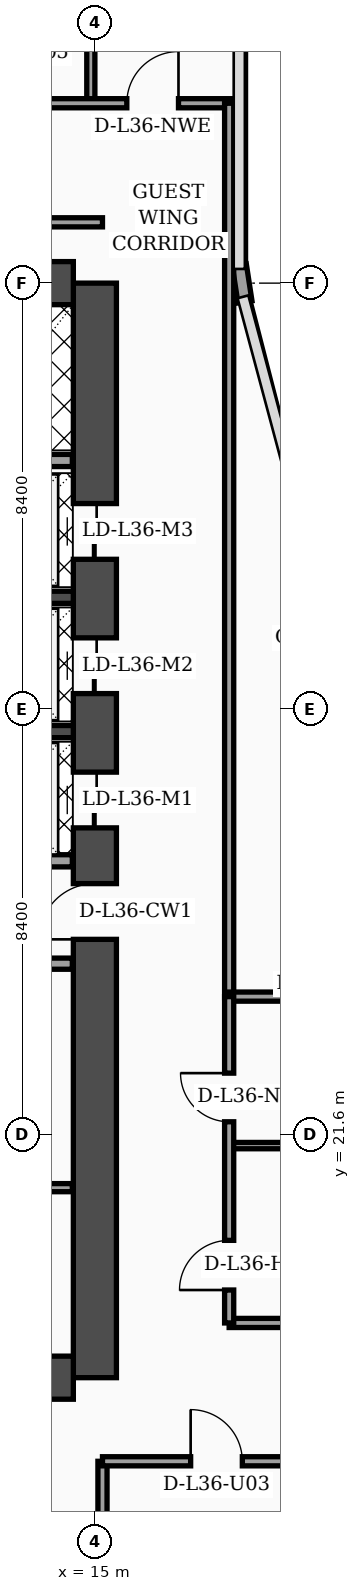
"""IFC4 building model, lengths in metres.
Left out: names, types, materials, properties, quantities, classifications, styles, units other than length and angle.
Written with IfcOpenShell. Run it as: python <this file> out.ifc"""

import sys

from ifc_helpers import new_model, si_unit, direction, frame, frame_2d, origin, place, context, subcontext, project, spatial, rectangle, extrude, element, fill, save


model = new_model("IFC4")
c1 = context("Model", 3, precision=1e-05, world=origin(), true_north=direction((0.0, 1.0)))
c2 = subcontext(c1, "Body", "Model", "MODEL_VIEW")
j1 = project(units=[si_unit("LENGTHUNIT", "METRE"), si_unit("PLANEANGLEUNIT", "RADIAN")], contexts=[c1])
p1 = place(None, origin())
s1 = spatial("IfcSite", under=j1, at=p1, CompositionType="ELEMENT")
p2 = place(p1, origin())
s2 = spatial("IfcBuilding", under=s1, at=p2, CompositionType="ELEMENT")
p3 = place(p2, frame((0.0, 0.0, 148.5)))
s3 = spatial("IfcBuildingStorey", under=s2, at=p3, CompositionType="ELEMENT", Elevation=148.5)
p4 = place(p3, frame((15.0, 16.8, 0.0), z_axis=(0.0, 0.0, 1.0), x_axis=(0.0, 1.0, 0.0)))
e1 = element("IfcWall", 1, at=p4, inside=s3, PredefinedType="SHEAR", context=c2, shape_type="SweptSolid", body=[
    extrude(rectangle(XDim=21.6, YDim=0.85, at=frame_2d((10.8, 0.0))), origin(), (0.0, 0.0, 1.0), 3.56),
])
p5 = place(p4, frame((8.65, 0.0, 0.0)))
e2 = element("IfcOpeningElement", 2, at=p5, cuts=e1, PredefinedType="OPENING", context=c2, shape_type="SweptSolid", body=[
    extrude(rectangle(XDim=1.1, YDim=2.2, at=frame_2d((0.55, 1.1))), frame((0.0, 0.435, 0.0), z_axis=(0.0, -1.0, 0.0), x_axis=(1.0, 0.0, 0.0)), (0.0, 0.0, 1.0), 0.87),
])
p6 = place(p4, frame((10.85, 0.0, 0.0)))
e3 = element("IfcOpeningElement", 3, at=p6, cuts=e1, PredefinedType="OPENING", context=c2, shape_type="SweptSolid", body=[
    extrude(rectangle(XDim=1.1, YDim=2.2, at=frame_2d((0.55, 1.1))), frame((0.0, 0.435, 0.0), z_axis=(0.0, -1.0, 0.0), x_axis=(1.0, 0.0, 0.0)), (0.0, 0.0, 1.0), 0.87),
])
p7 = place(p4, frame((13.5, 0.0, 0.0)))
e4 = element("IfcOpeningElement", 4, at=p7, cuts=e1, PredefinedType="OPENING", context=c2, shape_type="SweptSolid", body=[
    extrude(rectangle(XDim=1.1, YDim=2.2, at=frame_2d((0.55, 1.1))), frame((0.0, 0.435, 0.0), z_axis=(0.0, -1.0, 0.0), x_axis=(1.0, 0.0, 0.0)), (0.0, 0.0, 1.0), 0.87),
])
p8 = place(p4, frame((16.15, 0.0, 0.0)))
e5 = element("IfcOpeningElement", 5, at=p8, cuts=e1, PredefinedType="OPENING", context=c2, shape_type="SweptSolid", body=[
    extrude(rectangle(XDim=1.1, YDim=2.2, at=frame_2d((0.55, 1.1))), frame((0.0, 0.435, 0.0), z_axis=(0.0, -1.0, 0.0), x_axis=(1.0, 0.0, 0.0)), (0.0, 0.0, 1.0), 0.87),
])
for number, where, z_axis, x_axis in (
    (6, (4.625, 38.4, 0.0), (0.0, 0.0, 1.0), (1.0, 0.0, 0.0)),
    (7, (4.625, 16.8, 0.0), (0.0, 0.0, 1.0), (1.0, 0.0, 0.0)),
):
    element("IfcWall", number, at=place(p3, frame(where, z_axis=z_axis, x_axis=x_axis)), inside=s3, PredefinedType="SHEAR", context=c2, shape_type="SweptSolid", body=[
        extrude(rectangle(XDim=9.95, YDim=0.85, at=frame_2d((4.975, 0.0))), origin(), (0.0, 0.0, 1.0), 3.56),
    ])
for number, where, z_axis, x_axis in (
    (8, (12.18, 29.55, 0.0), (0.0, 0.0, 1.0), (1.0, 0.0, 0.0)),
    (9, (12.18, 32.2, 0.0), (0.0, 0.0, 1.0), (1.0, 0.0, 0.0)),
):
    element("IfcWall", number, at=place(p3, frame(where, z_axis=z_axis, x_axis=x_axis)), inside=s3, PredefinedType="SOLIDWALL", context=c2, shape_type="SweptSolid", body=[
        extrude(rectangle(XDim=2.395, YDim=0.24, at=frame_2d((1.198, 0.0))), origin(), (0.0, 0.0, 1.0), 3.56),
    ])
p9 = place(p3, frame((17.962, 38.03, 0.0), z_axis=(0.0, 0.0, 1.0), x_axis=(-0.15141125477, 0.988470855377, 0.0)))
e10 = element("IfcWall", 10, at=p9, inside=s3, PredefinedType="SOLIDWALL", context=c2, shape_type="SweptSolid", body=[
    extrude(rectangle(XDim=0.739, YDim=0.28, at=frame_2d((0.369, 0.0))), origin(), (0.0, 0.0, 1.0), 3.56),
])
p10 = place(p3, frame((9.68, 20.55, 0.0), z_axis=(0.0, 0.0, 1.0), x_axis=(1.0, 0.0, 0.0)))
e11 = element("IfcWall", 11, at=p10, inside=s3, PredefinedType="PARTITIONING", context=c2, shape_type="SweptSolid", body=[
    extrude(rectangle(XDim=4.875, YDim=0.16, at=frame_2d((2.438, 0.0))), origin(), (0.0, 0.0, 1.0), 3.56),
])
p11 = place(p10, frame((1.1, 0.0, 0.0)))
e12 = element("IfcOpeningElement", 12, at=p11, cuts=e11, PredefinedType="OPENING", context=c2, shape_type="SweptSolid", body=[
    extrude(rectangle(XDim=0.98, YDim=2.15, at=frame_2d((0.49, 1.075))), frame((0.0, 0.09, 0.0), z_axis=(0.0, -1.0, 0.0), x_axis=(1.0, 0.0, 0.0)), (0.0, 0.0, 1.0), 0.18),
])
p12 = place(p3, frame((9.68, 24.97, 0.0), z_axis=(0.0, 0.0, 1.0), x_axis=(1.0, 0.0, 0.0)))
e13 = element("IfcWall", 13, at=p12, inside=s3, PredefinedType="SOLIDWALL", context=c2, shape_type="SweptSolid", body=[
    extrude(rectangle(XDim=4.875, YDim=0.22, at=frame_2d((2.438, 0.0))), origin(), (0.0, 0.0, 1.0), 2.94),
])
p13 = place(p12, frame((0.9, 0.0, 0.0)))
e14 = element("IfcOpeningElement", 14, at=p13, cuts=e13, PredefinedType="OPENING", context=c2, shape_type="SweptSolid", body=[
    extrude(rectangle(XDim=0.98, YDim=2.15, at=frame_2d((0.49, 1.075))), frame((0.0, 0.12, 0.0), z_axis=(0.0, -1.0, 0.0), x_axis=(1.0, 0.0, 0.0)), (0.0, 0.0, 1.0), 0.24),
])
p14 = place(p3, frame((12.25, 27.0, 0.0), z_axis=(0.0, 0.0, 1.0), x_axis=(1.0, 0.0, 0.0)))
e15 = element("IfcWall", 15, at=p14, inside=s3, PredefinedType="SOLIDWALL", context=c2, shape_type="SweptSolid", body=[
    extrude(rectangle(XDim=2.305, YDim=0.24, at=frame_2d((1.152, 0.0))), origin(), (0.0, 0.0, 1.0), 3.56),
])
p15 = place(p3, frame((9.66, 34.9, 0.0), z_axis=(0.0, 0.0, 1.0), x_axis=(1.0, 0.0, 0.0)))
e16 = element("IfcWall", 16, at=p15, inside=s3, PredefinedType="SOLIDWALL", context=c2, shape_type="SweptSolid", body=[
    extrude(rectangle(XDim=4.895, YDim=0.24, at=frame_2d((2.448, 0.0))), origin(), (0.0, 0.0, 1.0), 3.56),
])
p16 = place(p3, frame((15.15, 2.44, 0.0), z_axis=(0.0, 0.0, 1.0), x_axis=(0.0, 1.0, 0.0)))
e17 = element("IfcWall", 17, at=p16, inside=s3, PredefinedType="PARTITIONING", context=c2, shape_type="SweptSolid", body=[
    extrude(rectangle(XDim=12.71, YDim=0.18, at=frame_2d((6.355, 0.0))), origin(), (0.0, 0.0, 1.0), 3.04),
])
p17 = place(p3, frame((15.15, 15.15, 0.0), z_axis=(0.0, 0.0, 1.0), x_axis=(1.0, 0.0, 0.0)))
e18 = element("IfcWall", 18, at=p17, inside=s3, PredefinedType="PARTITIONING", context=c2, shape_type="SweptSolid", body=[
    extrude(rectangle(XDim=6.45, YDim=0.18, at=frame_2d((3.225, 0.0))), origin(), (0.0, 0.0, 1.0), 2.49),
])
p18 = place(p17, frame((1.74, 0.0, 0.0)))
e19 = element("IfcOpeningElement", 19, at=p18, cuts=e18, PredefinedType="OPENING", context=c2, shape_type="SweptSolid", body=[
    extrude(rectangle(XDim=1.02, YDim=2.2, at=frame_2d((0.51, 1.1))), frame((0.0, 0.1, 0.0), z_axis=(0.0, -1.0, 0.0), x_axis=(1.0, 0.0, 0.0)), (0.0, 0.0, 1.0), 0.2),
])
p19 = place(p3, frame((14.92, 41.95, 0.0), z_axis=(0.0, 0.0, 1.0), x_axis=(0.0, 1.0, 0.0)))
e20 = element("IfcWall", 20, at=p19, inside=s3, PredefinedType="PARTITIONING", context=c2, shape_type="SweptSolid", body=[
    extrude(rectangle(XDim=5.85, YDim=0.16, at=frame_2d((2.925, 0.0))), origin(), (0.0, 0.0, 1.0), 3.04),
])
p20 = place(p3, frame((0.08, 41.95, 0.0), z_axis=(0.0, 0.0, 1.0), x_axis=(1.0, 0.0, 0.0)))
e21 = element("IfcWall", 21, at=p20, inside=s3, PredefinedType="PARTITIONING", context=c2, shape_type="SweptSolid", body=[
    extrude(rectangle(XDim=17.77, YDim=0.18, at=frame_2d((8.885, 0.0))), origin(), (0.0, 0.0, 1.0), 2.94),
])
p21 = place(p20, frame((0.9, 0.0, 0.0)))
e22 = element("IfcOpeningElement", 22, at=p21, cuts=e21, PredefinedType="OPENING", context=c2, shape_type="SweptSolid", body=[
    extrude(rectangle(XDim=1.02, YDim=2.2, at=frame_2d((0.51, 1.1))), frame((0.0, 0.1, 0.0), z_axis=(0.0, -1.0, 0.0), x_axis=(1.0, 0.0, 0.0)), (0.0, 0.0, 1.0), 0.2),
])
p22 = place(p20, frame((4.2, 0.0, 0.0)))
e23 = element("IfcOpeningElement", 23, at=p22, cuts=e21, PredefinedType="OPENING", context=c2, shape_type="SweptSolid", body=[
    extrude(rectangle(XDim=1.02, YDim=2.2, at=frame_2d((0.51, 1.1))), frame((0.0, 0.1, 0.0), z_axis=(0.0, -1.0, 0.0), x_axis=(1.0, 0.0, 0.0)), (0.0, 0.0, 1.0), 0.2),
])
p23 = place(p20, frame((10.08, 0.0, 0.0)))
e24 = element("IfcOpeningElement", 24, at=p23, cuts=e21, PredefinedType="OPENING", context=c2, shape_type="SweptSolid", body=[
    extrude(rectangle(XDim=1.02, YDim=2.2, at=frame_2d((0.51, 1.1))), frame((0.0, 0.1, 0.0), z_axis=(0.0, -1.0, 0.0), x_axis=(1.0, 0.0, 0.0)), (0.0, 0.0, 1.0), 0.2),
])
p24 = place(p20, frame((15.55, 0.0, 0.0)))
e25 = element("IfcOpeningElement", 25, at=p24, cuts=e21, PredefinedType="OPENING", context=c2, shape_type="SweptSolid", body=[
    extrude(rectangle(XDim=1.02, YDim=2.2, at=frame_2d((0.51, 1.1))), frame((0.0, 0.1, 0.0), z_axis=(0.0, -1.0, 0.0), x_axis=(1.0, 0.0, 0.0)), (0.0, 0.0, 1.0), 0.2),
])
p25 = place(p3, frame((17.65, 24.3, 0.0), z_axis=(0.0, 0.0, 1.0), x_axis=(0.0, 1.0, 0.0)))
e26 = element("IfcWall", 26, at=p25, inside=s3, PredefinedType="PARTITIONING", context=c2, shape_type="SweptSolid", body=[
    extrude(rectangle(XDim=17.65, YDim=0.18, at=frame_2d((8.825, 0.0))), origin(), (0.0, 0.0, 1.0), 2.94),
])
p26 = place(p3, frame((3.755, 39.6, 0.0), z_axis=(0.0, 0.0, 1.0), x_axis=(1.0, 0.0, 0.0)))
e27 = element("IfcWall", 27, at=p26, inside=s3, PredefinedType="PARTITIONING", context=c2, shape_type="SweptSolid", body=[
    extrude(rectangle(XDim=11.395, YDim=0.18, at=frame_2d((5.698, 0.0))), origin(), (0.0, 0.0, 1.0), 2.94),
])
p27 = place(p3, frame((17.65, 17.88, 0.0), z_axis=(0.0, 0.0, 1.0), x_axis=(1.0, 0.0, 0.0)))
e28 = element("IfcWall", 28, at=p27, inside=s3, PredefinedType="PARTITIONING", context=c2, shape_type="SweptSolid", body=[
    extrude(rectangle(XDim=3.9, YDim=0.18, at=frame_2d((1.95, 0.0))), origin(), (0.0, 0.0, 1.0), 3.09),
])
p28 = place(p3, frame((17.65, 21.38, 0.0), z_axis=(0.0, 0.0, 1.0), x_axis=(1.0, 0.0, 0.0)))
e29 = element("IfcWall", 29, at=p28, inside=s3, PredefinedType="PARTITIONING", context=c2, shape_type="SweptSolid", body=[
    extrude(rectangle(XDim=3.9, YDim=0.125, at=frame_2d((1.95, 0.0))), origin(), (0.0, 0.0, 1.0), 3.56),
])
p29 = place(p3, frame((17.65, 24.32, 0.0), z_axis=(0.0, 0.0, 1.0), x_axis=(1.0, 0.0, 0.0)))
e30 = element("IfcWall", 30, at=p29, inside=s3, PredefinedType="PARTITIONING", context=c2, shape_type="SweptSolid", body=[
    extrude(rectangle(XDim=3.95, YDim=0.18, at=frame_2d((1.975, 0.0))), origin(), (0.0, 0.0, 1.0), 3.56),
])
p30 = place(p3, frame((17.65, 17.88, 0.0), z_axis=(0.0, 0.0, 1.0), x_axis=(0.0, 1.0, 0.0)))
e31 = element("IfcWall", 31, at=p30, inside=s3, PredefinedType="PARTITIONING", context=c2, shape_type="SweptSolid", body=[
    extrude(rectangle(XDim=6.44, YDim=0.18, at=frame_2d((3.22, 0.0))), origin(), (0.0, 0.0, 1.0), 3.09),
])
p31 = place(p30, frame((0.65, 0.0, 0.0)))
e32 = element("IfcOpeningElement", 32, at=p31, cuts=e31, PredefinedType="OPENING", context=c2, shape_type="SweptSolid", body=[
    extrude(rectangle(XDim=0.98, YDim=2.15, at=frame_2d((0.49, 1.075))), frame((0.0, 0.1, 0.0), z_axis=(0.0, -1.0, 0.0), x_axis=(1.0, 0.0, 0.0)), (0.0, 0.0, 1.0), 0.2),
])
p32 = place(p30, frame((3.97, 0.0, 0.0)))
e33 = element("IfcOpeningElement", 33, at=p32, cuts=e31, PredefinedType="OPENING", context=c2, shape_type="SweptSolid", body=[
    extrude(rectangle(XDim=0.96, YDim=2.2, at=frame_2d((0.48, 1.1))), frame((0.0, 0.1, 0.0), z_axis=(0.0, -1.0, 0.0), x_axis=(1.0, 0.0, 0.0)), (0.0, 0.0, 1.0), 0.2),
])
p33 = place(p18, origin())
e34 = element("IfcDoor", 34, at=p33, inside=s3, OperationType="SINGLE_SWING_LEFT", PredefinedType="DOOR", context=c2, shape_type="SweptSolid", body=[
    extrude(rectangle(XDim=1.02, YDim=2.2, at=frame_2d((0.51, 1.1))), frame((0.0, 0.025, 0.0), z_axis=(0.0, -1.0, 0.0), x_axis=(1.0, 0.0, 0.0)), (0.0, 0.0, 1.0), 0.05),
])
fill(e19, e34)
p34 = place(p24, origin())
e35 = element("IfcDoor", 35, at=p34, inside=s3, OperationType="SINGLE_SWING_RIGHT", PredefinedType="DOOR", context=c2, shape_type="SweptSolid", body=[
    extrude(rectangle(XDim=1.02, YDim=2.2, at=frame_2d((0.51, 1.1))), frame((0.0, 0.025, 0.0), z_axis=(0.0, -1.0, 0.0), x_axis=(1.0, 0.0, 0.0)), (0.0, 0.0, 1.0), 0.05),
])
fill(e25, e35)
p35 = place(p31, origin())
e36 = element("IfcDoor", 36, at=p35, inside=s3, OperationType="SINGLE_SWING_LEFT", PredefinedType="DOOR", context=c2, shape_type="SweptSolid", body=[
    extrude(rectangle(XDim=0.98, YDim=2.15, at=frame_2d((0.49, 1.075))), frame((0.0, 0.025, 0.0), z_axis=(0.0, -1.0, 0.0), x_axis=(1.0, 0.0, 0.0)), (0.0, 0.0, 1.0), 0.05),
])
fill(e32, e36)
p36 = place(p32, origin())
e37 = element("IfcDoor", 37, at=p36, inside=s3, OperationType="SINGLE_SWING_RIGHT", PredefinedType="DOOR", context=c2, shape_type="SweptSolid", body=[
    extrude(rectangle(XDim=0.96, YDim=2.2, at=frame_2d((0.48, 1.1))), frame((0.0, 0.025, 0.0), z_axis=(0.0, -1.0, 0.0), x_axis=(1.0, 0.0, 0.0)), (0.0, 0.0, 1.0), 0.05),
])
fill(e33, e37)
p37 = place(p5, origin())
e38 = element("IfcDoor", 38, at=p37, inside=s3, OperationType="SINGLE_SWING_LEFT", PredefinedType="DOOR", context=c2, shape_type="SweptSolid", body=[
    extrude(rectangle(XDim=1.1, YDim=2.2, at=frame_2d((0.55, 1.1))), frame((0.0, 0.025, 0.0), z_axis=(0.0, -1.0, 0.0), x_axis=(1.0, 0.0, 0.0)), (0.0, 0.0, 1.0), 0.05),
])
fill(e2, e38)
p38 = place(p6, origin())
e39 = element("IfcDoor", 39, at=p38, inside=s3, OperationType="DOUBLE_DOOR_SLIDING", PredefinedType="DOOR", context=c2, shape_type="SweptSolid", body=[
    extrude(rectangle(XDim=1.1, YDim=2.2, at=frame_2d((0.55, 1.1))), frame((0.0, 0.025, 0.0), z_axis=(0.0, -1.0, 0.0), x_axis=(1.0, 0.0, 0.0)), (0.0, 0.0, 1.0), 0.05),
])
fill(e3, e39)
p39 = place(p7, origin())
e40 = element("IfcDoor", 40, at=p39, inside=s3, OperationType="DOUBLE_DOOR_SLIDING", PredefinedType="DOOR", context=c2, shape_type="SweptSolid", body=[
    extrude(rectangle(XDim=1.1, YDim=2.2, at=frame_2d((0.55, 1.1))), frame((0.0, 0.025, 0.0), z_axis=(0.0, -1.0, 0.0), x_axis=(1.0, 0.0, 0.0)), (0.0, 0.0, 1.0), 0.05),
])
fill(e4, e40)
p40 = place(p8, origin())
e41 = element("IfcDoor", 41, at=p40, inside=s3, OperationType="DOUBLE_DOOR_SLIDING", PredefinedType="DOOR", context=c2, shape_type="SweptSolid", body=[
    extrude(rectangle(XDim=1.1, YDim=2.2, at=frame_2d((0.55, 1.1))), frame((0.0, 0.025, 0.0), z_axis=(0.0, -1.0, 0.0), x_axis=(1.0, 0.0, 0.0)), (0.0, 0.0, 1.0), 0.05),
])
fill(e5, e41)
save(model, sys.argv[1])
